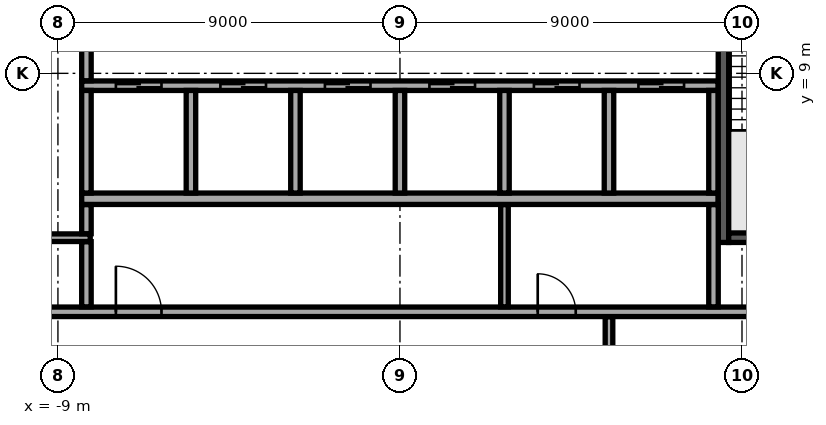
"""IFC4 building model, lengths in metres.
Left out: names, types, materials, properties, quantities, classifications, styles, units other than length and angle.
Written with IfcOpenShell. Run it as: python <this file> out.ifc"""

import sys

from ifc_helpers import new_model, si_unit, direction, frame, frame_2d, origin, place, context, subcontext, project, spatial, rectangle, extrude, element, fill, save


model = new_model("IFC4")
c1 = context("Model", 3, precision=1e-05, world=origin(), true_north=direction((0.0, 1.0)))
c2 = subcontext(c1, "Body", "Model", "MODEL_VIEW")
j1 = project(units=[si_unit("LENGTHUNIT", "METRE"), si_unit("PLANEANGLEUNIT", "RADIAN")], contexts=[c1])
p1 = place(None, origin())
s1 = spatial("IfcSite", under=j1, at=p1, CompositionType="ELEMENT")
p2 = place(p1, origin())
s2 = spatial("IfcBuilding", under=s1, at=p2, CompositionType="ELEMENT")
p3 = place(p2, frame((0.0, 0.0, 274.9)))
s3 = spatial("IfcBuildingStorey", under=s2, at=p3, CompositionType="ELEMENT", Elevation=274.9)
p4 = place(p3, frame((-8.375, 5.7, 0.0), z_axis=(0.0, 0.0, 1.0), x_axis=(1.0, 0.0, 0.0)))
e1 = element("IfcWall", 1, at=p4, inside=s3, PredefinedType="SOLIDWALL", context=c2, shape_type="SweptSolid", body=[
    extrude(rectangle(XDim=16.75, YDim=0.3, at=frame_2d((8.375, 0.0))), origin(), (0.0, 0.0, 1.0), 3.64),
])
p5 = place(p3, frame((-8.375, 8.675, 0.0), z_axis=(0.0, 0.0, 1.0), x_axis=(1.0, 0.0, 0.0)))
e2 = element("IfcWall", 2, at=p5, inside=s3, PredefinedType="SOLIDWALL", context=c2, shape_type="SweptSolid", body=[
    extrude(rectangle(XDim=16.75, YDim=0.25, at=frame_2d((8.375, 0.0))), origin(), (0.0, 0.0, 1.0), 3.64),
])
p6 = place(p5, frame((0.9, 0.0, 0.0)))
e3 = element("IfcOpeningElement", 3, at=p6, cuts=e2, PredefinedType="OPENING", context=c2, shape_type="SweptSolid", body=[
    extrude(rectangle(XDim=1.2, YDim=2.1, at=frame_2d((0.6, 1.05))), frame((0.0, 0.135, 0.0), z_axis=(0.0, -1.0, 0.0), x_axis=(1.0, 0.0, 0.0)), (0.0, 0.0, 1.0), 0.27),
])
p7 = place(p5, frame((3.65, 0.0, 0.0)))
e4 = element("IfcOpeningElement", 4, at=p7, cuts=e2, PredefinedType="OPENING", context=c2, shape_type="SweptSolid", body=[
    extrude(rectangle(XDim=1.2, YDim=2.1, at=frame_2d((0.6, 1.05))), frame((0.0, 0.135, 0.0), z_axis=(0.0, -1.0, 0.0), x_axis=(1.0, 0.0, 0.0)), (0.0, 0.0, 1.0), 0.27),
])
p8 = place(p5, frame((6.4, 0.0, 0.0)))
e5 = element("IfcOpeningElement", 5, at=p8, cuts=e2, PredefinedType="OPENING", context=c2, shape_type="SweptSolid", body=[
    extrude(rectangle(XDim=1.2, YDim=2.1, at=frame_2d((0.6, 1.05))), frame((0.0, 0.135, 0.0), z_axis=(0.0, -1.0, 0.0), x_axis=(1.0, 0.0, 0.0)), (0.0, 0.0, 1.0), 0.27),
])
p9 = place(p5, frame((9.15, 0.0, 0.0)))
e6 = element("IfcOpeningElement", 6, at=p9, cuts=e2, PredefinedType="OPENING", context=c2, shape_type="SweptSolid", body=[
    extrude(rectangle(XDim=1.2, YDim=2.1, at=frame_2d((0.6, 1.05))), frame((0.0, 0.135, 0.0), z_axis=(0.0, -1.0, 0.0), x_axis=(1.0, 0.0, 0.0)), (0.0, 0.0, 1.0), 0.27),
])
p10 = place(p5, frame((11.9, 0.0, 0.0)))
e7 = element("IfcOpeningElement", 7, at=p10, cuts=e2, PredefinedType="OPENING", context=c2, shape_type="SweptSolid", body=[
    extrude(rectangle(XDim=1.2, YDim=2.1, at=frame_2d((0.6, 1.05))), frame((0.0, 0.135, 0.0), z_axis=(0.0, -1.0, 0.0), x_axis=(1.0, 0.0, 0.0)), (0.0, 0.0, 1.0), 0.27),
])
p11 = place(p5, frame((14.65, 0.0, 0.0)))
e8 = element("IfcOpeningElement", 8, at=p11, cuts=e2, PredefinedType="OPENING", context=c2, shape_type="SweptSolid", body=[
    extrude(rectangle(XDim=1.2, YDim=2.1, at=frame_2d((0.6, 1.05))), frame((0.0, 0.135, 0.0), z_axis=(0.0, -1.0, 0.0), x_axis=(1.0, 0.0, 0.0)), (0.0, 0.0, 1.0), 0.27),
])
for number, where, z_axis, x_axis in (
    (9, (-8.25, 5.85, 0.0), (0.0, 0.0, 1.0), (0.0, 1.0, 0.0)),
    (10, (-5.5, 5.85, 0.0), (0.0, 0.0, 1.0), (0.0, 1.0, 0.0)),
    (11, (-2.75, 5.85, 0.0), (0.0, 0.0, 1.0), (0.0, 1.0, 0.0)),
    (12, (0.0, 5.85, 0.0), (0.0, 0.0, 1.0), (0.0, 1.0, 0.0)),
    (13, (2.75, 5.85, 0.0), (0.0, 0.0, 1.0), (0.0, 1.0, 0.0)),
    (14, (5.5, 5.85, 0.0), (0.0, 0.0, 1.0), (0.0, 1.0, 0.0)),
    (15, (8.25, 5.85, 0.0), (0.0, 0.0, 1.0), (0.0, 1.0, 0.0)),
):
    element("IfcWall", number, at=place(p3, frame(where, z_axis=z_axis, x_axis=x_axis)), inside=s3, PredefinedType="SOLIDWALL", context=c2, shape_type="SweptSolid", body=[
        extrude(rectangle(XDim=2.7, YDim=0.25, at=frame_2d((1.35, 0.0))), origin(), (0.0, 0.0, 1.0), 3.64),
    ])
p12 = place(p3, frame((8.512, 4.55, 0.0), z_axis=(0.0, 0.0, 1.0), x_axis=(0.0, 1.0, 0.0)))
e16 = element("IfcWall", 16, at=p12, inside=s3, PredefinedType="SOLIDWALL", context=c2, shape_type="SweptSolid", body=[
    extrude(rectangle(XDim=7.25, YDim=0.275, at=frame_2d((3.625, 0.0))), origin(), (0.0, 0.0, 1.0), 3.64),
])
p13 = place(p12, frame((6.0, 0.0, 0.0)))
e17 = element("IfcOpeningElement", 17, at=p13, cuts=e16, PredefinedType="OPENING", context=c2, shape_type="SweptSolid", body=[
    extrude(rectangle(XDim=1.0, YDim=2.1, at=frame_2d((0.5, 1.05))), frame((0.0, 0.147, 0.0), z_axis=(0.0, -1.0, 0.0), x_axis=(1.0, 0.0, 0.0)), (0.0, 0.0, 1.0), 0.295),
])
p14 = place(p3, frame((8.65, 4.675, 0.0), z_axis=(0.0, 0.0, 1.0), x_axis=(1.0, 0.0, 0.0)))
e18 = element("IfcWall", 18, at=p14, inside=s3, PredefinedType="SOLIDWALL", context=c2, shape_type="SweptSolid", body=[
    extrude(rectangle(XDim=3.15, YDim=0.25, at=frame_2d((1.575, 0.0))), origin(), (0.0, 0.0, 1.0), 3.64),
])
p15 = place(p3, frame((5.5, -2.595, 0.0), z_axis=(0.0, 0.0, 1.0), x_axis=(0.0, 1.0, 0.0)))
e19 = element("IfcWall", 19, at=p15, inside=s3, PredefinedType="PARTITIONING", context=c2, shape_type="SweptSolid", body=[
    extrude(rectangle(XDim=5.19, YDim=0.2, at=frame_2d((2.595, 0.0))), origin(), (0.0, 0.0, 1.0), 3.64),
])
p16 = place(p15, frame((1.395, 0.0, 0.0)))
e20 = element("IfcOpeningElement", 20, at=p16, cuts=e19, PredefinedType="OPENING", context=c2, shape_type="SweptSolid", body=[
    extrude(rectangle(XDim=2.4, YDim=2.4, at=frame_2d((1.2, 1.2))), frame((0.0, 0.11, 0.0), z_axis=(0.0, -1.0, 0.0), x_axis=(1.0, 0.0, 0.0)), (0.0, 0.0, 1.0), 0.22),
])
p17 = place(p3, frame((-11.795, 2.725, 0.0), z_axis=(0.0, 0.0, 1.0), x_axis=(1.0, 0.0, 0.0)))
e21 = element("IfcWall", 21, at=p17, inside=s3, PredefinedType="PARTITIONING", context=c2, shape_type="SweptSolid", body=[
    extrude(rectangle(XDim=23.59, YDim=0.25, at=frame_2d((11.795, 0.0))), origin(), (0.0, 0.0, 1.0), 3.64),
])
p18 = place(p17, frame((21.345, 0.0, 0.0)))
e22 = element("IfcOpeningElement", 22, at=p18, cuts=e21, PredefinedType="OPENING", context=c2, shape_type="SweptSolid", body=[
    extrude(rectangle(XDim=0.9, YDim=2.1, at=frame_2d((0.45, 1.05))), frame((0.0, 0.135, 0.0), z_axis=(0.0, -1.0, 0.0), x_axis=(1.0, 0.0, 0.0)), (0.0, 0.0, 1.0), 0.27),
])
p19 = place(p17, frame((1.345, 0.0, 0.0)))
e23 = element("IfcOpeningElement", 23, at=p19, cuts=e21, PredefinedType="OPENING", context=c2, shape_type="SweptSolid", body=[
    extrude(rectangle(XDim=0.9, YDim=2.1, at=frame_2d((0.45, 1.05))), frame((0.0, 0.135, 0.0), z_axis=(0.0, -1.0, 0.0), x_axis=(1.0, 0.0, 0.0)), (0.0, 0.0, 1.0), 0.27),
])
p20 = place(p17, frame((4.32, 0.0, 0.0)))
e24 = element("IfcOpeningElement", 24, at=p20, cuts=e21, PredefinedType="OPENING", context=c2, shape_type="SweptSolid", body=[
    extrude(rectangle(XDim=1.2, YDim=2.1, at=frame_2d((0.6, 1.05))), frame((0.0, 0.135, 0.0), z_axis=(0.0, -1.0, 0.0), x_axis=(1.0, 0.0, 0.0)), (0.0, 0.0, 1.0), 0.27),
])
p21 = place(p17, frame((15.42, 0.0, 0.0)))
e25 = element("IfcOpeningElement", 25, at=p21, cuts=e21, PredefinedType="OPENING", context=c2, shape_type="SweptSolid", body=[
    extrude(rectangle(XDim=1.0, YDim=2.1, at=frame_2d((0.5, 1.05))), frame((0.0, 0.135, 0.0), z_axis=(0.0, -1.0, 0.0), x_axis=(1.0, 0.0, 0.0)), (0.0, 0.0, 1.0), 0.27),
])
p22 = place(p3, frame((-8.25, 2.855, 0.0), z_axis=(0.0, 0.0, 1.0), x_axis=(0.0, 1.0, 0.0)))
e26 = element("IfcWall", 26, at=p22, inside=s3, PredefinedType="PARTITIONING", context=c2, shape_type="SweptSolid", body=[
    extrude(rectangle(XDim=1.715, YDim=0.25, at=frame_2d((0.857, 0.0))), origin(), (0.0, 0.0, 1.0), 3.64),
])
p23 = place(p3, frame((2.75, 2.855, 0.0), z_axis=(0.0, 0.0, 1.0), x_axis=(0.0, 1.0, 0.0)))
e27 = element("IfcWall", 27, at=p23, inside=s3, PredefinedType="PARTITIONING", context=c2, shape_type="SweptSolid", body=[
    extrude(rectangle(XDim=2.69, YDim=0.2, at=frame_2d((1.345, 0.0))), origin(), (0.0, 0.0, 1.0), 3.64),
])
p24 = place(p3, frame((8.25, 2.855, 0.0), z_axis=(0.0, 0.0, 1.0), x_axis=(0.0, 1.0, 0.0)))
e28 = element("IfcWall", 28, at=p24, inside=s3, PredefinedType="PARTITIONING", context=c2, shape_type="SweptSolid", body=[
    extrude(rectangle(XDim=2.69, YDim=0.25, at=frame_2d((1.345, 0.0))), origin(), (0.0, 0.0, 1.0), 3.64),
])
p25 = place(p3, frame((-11.795, 4.675, 0.0), z_axis=(0.0, 0.0, 1.0), x_axis=(1.0, 0.0, 0.0)))
e29 = element("IfcWall", 29, at=p25, inside=s3, PredefinedType="PARTITIONING", context=c2, shape_type="SweptSolid", body=[
    extrude(rectangle(XDim=3.645, YDim=0.2, at=frame_2d((1.823, 0.0))), origin(), (0.0, 0.0, 1.0), 3.64),
])
p26 = place(p3, frame((-8.25, 4.78, 0.0), z_axis=(0.0, 0.0, 1.0), x_axis=(0.0, 1.0, 0.0)))
e30 = element("IfcWall", 30, at=p26, inside=s3, PredefinedType="PARTITIONING", context=c2, shape_type="SweptSolid", body=[
    extrude(rectangle(XDim=0.765, YDim=0.25, at=frame_2d((0.382, 0.0))), origin(), (0.0, 0.0, 1.0), 3.64),
])
p27 = place(p3, frame((-8.25, 8.805, 0.0), z_axis=(0.0, 0.0, 1.0), x_axis=(0.0, 1.0, 0.0)))
e31 = element("IfcWall", 31, at=p27, inside=s3, PredefinedType="PARTITIONING", context=c2, shape_type="SweptSolid", body=[
    extrude(rectangle(XDim=2.99, YDim=0.25, at=frame_2d((1.495, 0.0))), origin(), (0.0, 0.0, 1.0), 3.64),
])
p28 = place(p27, frame((0.895, 0.0, 0.0)))
e32 = element("IfcOpeningElement", 32, at=p28, cuts=e31, PredefinedType="OPENING", context=c2, shape_type="SweptSolid", body=[
    extrude(rectangle(XDim=1.0, YDim=2.1, at=frame_2d((0.5, 1.05))), frame((0.0, 0.135, 0.0), z_axis=(0.0, -1.0, 0.0), x_axis=(1.0, 0.0, 0.0)), (0.0, 0.0, 1.0), 0.27),
])
p29 = place(p3, frame((-9.159, 32.618, 0.0), z_axis=(0.0, 0.0, 1.0), x_axis=(-0.469470468388, -0.88294817476, 0.0)))
e33 = element("IfcWall", 33, at=p29, inside=s3, PredefinedType="STANDARD", context=c2, shape_type="SweptSolid", body=[
    extrude(rectangle(XDim=48.843, YDim=0.6, at=frame_2d((24.422, 0.0))), origin(), (0.0, 0.0, 1.0), 3.64),
])
p30 = place(p29, frame((1.22, 0.0, 0.9)))
e34 = element("IfcOpeningElement", 34, at=p30, cuts=e33, PredefinedType="OPENING", context=c2, shape_type="SweptSolid", body=[
    extrude(rectangle(XDim=2.0, YDim=2.1, at=frame_2d((1.0, 1.05))), frame((0.0, 0.31, 0.0), z_axis=(0.0, -1.0, 0.0), x_axis=(1.0, 0.0, 0.0)), (0.0, 0.0, 1.0), 0.62),
])
p31 = place(p29, frame((5.66, 0.0, 0.9)))
e35 = element("IfcOpeningElement", 35, at=p31, cuts=e33, PredefinedType="OPENING", context=c2, shape_type="SweptSolid", body=[
    extrude(rectangle(XDim=2.0, YDim=2.1, at=frame_2d((1.0, 1.05))), frame((0.0, 0.31, 0.0), z_axis=(0.0, -1.0, 0.0), x_axis=(1.0, 0.0, 0.0)), (0.0, 0.0, 1.0), 0.62),
])
p32 = place(p29, frame((10.101, 0.0, 0.9)))
e36 = element("IfcOpeningElement", 36, at=p32, cuts=e33, PredefinedType="OPENING", context=c2, shape_type="SweptSolid", body=[
    extrude(rectangle(XDim=2.0, YDim=2.1, at=frame_2d((1.0, 1.05))), frame((0.0, 0.31, 0.0), z_axis=(0.0, -1.0, 0.0), x_axis=(1.0, 0.0, 0.0)), (0.0, 0.0, 1.0), 0.62),
])
p33 = place(p29, frame((14.541, 0.0, 0.9)))
e37 = element("IfcOpeningElement", 37, at=p33, cuts=e33, PredefinedType="OPENING", context=c2, shape_type="SweptSolid", body=[
    extrude(rectangle(XDim=2.0, YDim=2.1, at=frame_2d((1.0, 1.05))), frame((0.0, 0.31, 0.0), z_axis=(0.0, -1.0, 0.0), x_axis=(1.0, 0.0, 0.0)), (0.0, 0.0, 1.0), 0.62),
])
p34 = place(p29, frame((18.981, 0.0, 0.9)))
e38 = element("IfcOpeningElement", 38, at=p34, cuts=e33, PredefinedType="OPENING", context=c2, shape_type="SweptSolid", body=[
    extrude(rectangle(XDim=2.0, YDim=2.1, at=frame_2d((1.0, 1.05))), frame((0.0, 0.31, 0.0), z_axis=(0.0, -1.0, 0.0), x_axis=(1.0, 0.0, 0.0)), (0.0, 0.0, 1.0), 0.62),
])
p35 = place(p29, frame((23.422, 0.0, 0.9)))
e39 = element("IfcOpeningElement", 39, at=p35, cuts=e33, PredefinedType="OPENING", context=c2, shape_type="SweptSolid", body=[
    extrude(rectangle(XDim=2.0, YDim=2.1, at=frame_2d((1.0, 1.05))), frame((0.0, 0.31, 0.0), z_axis=(0.0, -1.0, 0.0), x_axis=(1.0, 0.0, 0.0)), (0.0, 0.0, 1.0), 0.62),
])
p36 = place(p29, frame((27.862, 0.0, 0.9)))
e40 = element("IfcOpeningElement", 40, at=p36, cuts=e33, PredefinedType="OPENING", context=c2, shape_type="SweptSolid", body=[
    extrude(rectangle(XDim=2.0, YDim=2.1, at=frame_2d((1.0, 1.05))), frame((0.0, 0.31, 0.0), z_axis=(0.0, -1.0, 0.0), x_axis=(1.0, 0.0, 0.0)), (0.0, 0.0, 1.0), 0.62),
])
p37 = place(p29, frame((32.302, 0.0, 0.9)))
e41 = element("IfcOpeningElement", 41, at=p37, cuts=e33, PredefinedType="OPENING", context=c2, shape_type="SweptSolid", body=[
    extrude(rectangle(XDim=2.0, YDim=2.1, at=frame_2d((1.0, 1.05))), frame((0.0, 0.31, 0.0), z_axis=(0.0, -1.0, 0.0), x_axis=(1.0, 0.0, 0.0)), (0.0, 0.0, 1.0), 0.62),
])
p38 = place(p29, frame((36.742, 0.0, 0.9)))
e42 = element("IfcOpeningElement", 42, at=p38, cuts=e33, PredefinedType="OPENING", context=c2, shape_type="SweptSolid", body=[
    extrude(rectangle(XDim=2.0, YDim=2.1, at=frame_2d((1.0, 1.05))), frame((0.0, 0.31, 0.0), z_axis=(0.0, -1.0, 0.0), x_axis=(1.0, 0.0, 0.0)), (0.0, 0.0, 1.0), 0.62),
])
p39 = place(p29, frame((41.183, 0.0, 0.9)))
e43 = element("IfcOpeningElement", 43, at=p39, cuts=e33, PredefinedType="OPENING", context=c2, shape_type="SweptSolid", body=[
    extrude(rectangle(XDim=2.0, YDim=2.1, at=frame_2d((1.0, 1.05))), frame((0.0, 0.31, 0.0), z_axis=(0.0, -1.0, 0.0), x_axis=(1.0, 0.0, 0.0)), (0.0, 0.0, 1.0), 0.62),
])
p40 = place(p29, frame((45.623, 0.0, 0.9)))
e44 = element("IfcOpeningElement", 44, at=p40, cuts=e33, PredefinedType="OPENING", context=c2, shape_type="SweptSolid", body=[
    extrude(rectangle(XDim=2.0, YDim=2.1, at=frame_2d((1.0, 1.05))), frame((0.0, 0.31, 0.0), z_axis=(0.0, -1.0, 0.0), x_axis=(1.0, 0.0, 0.0)), (0.0, 0.0, 1.0), 0.62),
])
p41 = place(p3, frame((9.233, -32.479, 0.0), z_axis=(0.0, 0.0, 1.0), x_axis=(0.469468429065, 0.882949259081, 0.0)))
e45 = element("IfcWall", 45, at=p41, inside=s3, PredefinedType="STANDARD", context=c2, shape_type="SweptSolid", body=[
    extrude(rectangle(XDim=48.686, YDim=0.6, at=frame_2d((24.343, 0.0))), origin(), (0.0, 0.0, 1.0), 3.64),
])
p42 = place(p41, frame((1.213, 0.0, 0.9)))
e46 = element("IfcOpeningElement", 46, at=p42, cuts=e45, PredefinedType="OPENING", context=c2, shape_type="SweptSolid", body=[
    extrude(rectangle(XDim=2.0, YDim=2.1, at=frame_2d((1.0, 1.05))), frame((0.0, 0.31, 0.0), z_axis=(0.0, -1.0, 0.0), x_axis=(1.0, 0.0, 0.0)), (0.0, 0.0, 1.0), 0.62),
])
p43 = place(p41, frame((5.639, 0.0, 0.9)))
e47 = element("IfcOpeningElement", 47, at=p43, cuts=e45, PredefinedType="OPENING", context=c2, shape_type="SweptSolid", body=[
    extrude(rectangle(XDim=2.0, YDim=2.1, at=frame_2d((1.0, 1.05))), frame((0.0, 0.31, 0.0), z_axis=(0.0, -1.0, 0.0), x_axis=(1.0, 0.0, 0.0)), (0.0, 0.0, 1.0), 0.62),
])
p44 = place(p41, frame((10.065, 0.0, 0.9)))
e48 = element("IfcOpeningElement", 48, at=p44, cuts=e45, PredefinedType="OPENING", context=c2, shape_type="SweptSolid", body=[
    extrude(rectangle(XDim=2.0, YDim=2.1, at=frame_2d((1.0, 1.05))), frame((0.0, 0.31, 0.0), z_axis=(0.0, -1.0, 0.0), x_axis=(1.0, 0.0, 0.0)), (0.0, 0.0, 1.0), 0.62),
])
p45 = place(p41, frame((14.491, 0.0, 0.9)))
e49 = element("IfcOpeningElement", 49, at=p45, cuts=e45, PredefinedType="OPENING", context=c2, shape_type="SweptSolid", body=[
    extrude(rectangle(XDim=2.0, YDim=2.1, at=frame_2d((1.0, 1.05))), frame((0.0, 0.31, 0.0), z_axis=(0.0, -1.0, 0.0), x_axis=(1.0, 0.0, 0.0)), (0.0, 0.0, 1.0), 0.62),
])
p46 = place(p41, frame((18.917, 0.0, 0.9)))
e50 = element("IfcOpeningElement", 50, at=p46, cuts=e45, PredefinedType="OPENING", context=c2, shape_type="SweptSolid", body=[
    extrude(rectangle(XDim=2.0, YDim=2.1, at=frame_2d((1.0, 1.05))), frame((0.0, 0.31, 0.0), z_axis=(0.0, -1.0, 0.0), x_axis=(1.0, 0.0, 0.0)), (0.0, 0.0, 1.0), 0.62),
])
p47 = place(p41, frame((23.343, 0.0, 0.9)))
e51 = element("IfcOpeningElement", 51, at=p47, cuts=e45, PredefinedType="OPENING", context=c2, shape_type="SweptSolid", body=[
    extrude(rectangle(XDim=2.0, YDim=2.1, at=frame_2d((1.0, 1.05))), frame((0.0, 0.31, 0.0), z_axis=(0.0, -1.0, 0.0), x_axis=(1.0, 0.0, 0.0)), (0.0, 0.0, 1.0), 0.62),
])
p48 = place(p41, frame((27.769, 0.0, 0.9)))
e52 = element("IfcOpeningElement", 52, at=p48, cuts=e45, PredefinedType="OPENING", context=c2, shape_type="SweptSolid", body=[
    extrude(rectangle(XDim=2.0, YDim=2.1, at=frame_2d((1.0, 1.05))), frame((0.0, 0.31, 0.0), z_axis=(0.0, -1.0, 0.0), x_axis=(1.0, 0.0, 0.0)), (0.0, 0.0, 1.0), 0.62),
])
p49 = place(p41, frame((32.195, 0.0, 0.9)))
e53 = element("IfcOpeningElement", 53, at=p49, cuts=e45, PredefinedType="OPENING", context=c2, shape_type="SweptSolid", body=[
    extrude(rectangle(XDim=2.0, YDim=2.1, at=frame_2d((1.0, 1.05))), frame((0.0, 0.31, 0.0), z_axis=(0.0, -1.0, 0.0), x_axis=(1.0, 0.0, 0.0)), (0.0, 0.0, 1.0), 0.62),
])
p50 = place(p41, frame((36.621, 0.0, 0.9)))
e54 = element("IfcOpeningElement", 54, at=p50, cuts=e45, PredefinedType="OPENING", context=c2, shape_type="SweptSolid", body=[
    extrude(rectangle(XDim=2.0, YDim=2.1, at=frame_2d((1.0, 1.05))), frame((0.0, 0.31, 0.0), z_axis=(0.0, -1.0, 0.0), x_axis=(1.0, 0.0, 0.0)), (0.0, 0.0, 1.0), 0.62),
])
p51 = place(p41, frame((41.047, 0.0, 0.9)))
e55 = element("IfcOpeningElement", 55, at=p51, cuts=e45, PredefinedType="OPENING", context=c2, shape_type="SweptSolid", body=[
    extrude(rectangle(XDim=2.0, YDim=2.1, at=frame_2d((1.0, 1.05))), frame((0.0, 0.31, 0.0), z_axis=(0.0, -1.0, 0.0), x_axis=(1.0, 0.0, 0.0)), (0.0, 0.0, 1.0), 0.62),
])
p52 = place(p41, frame((45.473, 0.0, 0.9)))
e56 = element("IfcOpeningElement", 56, at=p52, cuts=e45, PredefinedType="OPENING", context=c2, shape_type="SweptSolid", body=[
    extrude(rectangle(XDim=2.0, YDim=2.1, at=frame_2d((1.0, 1.05))), frame((0.0, 0.31, 0.0), z_axis=(0.0, -1.0, 0.0), x_axis=(1.0, 0.0, 0.0)), (0.0, 0.0, 1.0), 0.62),
])
p53 = place(p3, frame((-8.385, 26.033, 0.0), z_axis=(0.0, 0.0, 1.0), x_axis=(0.882949433839, -0.46946810039, 0.0)))
e57 = element("IfcWall", 57, at=p53, inside=s3, PredefinedType="PARTITIONING", context=c2, shape_type="SweptSolid", body=[
    extrude(rectangle(XDim=39.325, YDim=0.15, at=frame_2d((19.662, 0.0))), origin(), (0.0, 0.0, 1.0), 3.04),
])
p54 = place(p53, frame((10.622, 0.0, 0.0)))
e58 = element("IfcOpeningElement", 58, at=p54, cuts=e57, PredefinedType="OPENING", context=c2, shape_type="SweptSolid", body=[
    extrude(rectangle(XDim=1.0, YDim=2.1, at=frame_2d((0.5, 1.05))), frame((0.0, 0.085, 0.0), z_axis=(0.0, -1.0, 0.0), x_axis=(1.0, 0.0, 0.0)), (0.0, 0.0, 1.0), 0.17),
])
p55 = place(p53, frame((16.615, 0.0, 0.0)))
e59 = element("IfcOpeningElement", 59, at=p55, cuts=e57, PredefinedType="OPENING", context=c2, shape_type="SweptSolid", body=[
    extrude(rectangle(XDim=1.0, YDim=2.1, at=frame_2d((0.5, 1.05))), frame((0.0, 0.085, 0.0), z_axis=(0.0, -1.0, 0.0), x_axis=(1.0, 0.0, 0.0)), (0.0, 0.0, 1.0), 0.17),
])
p56 = place(p53, frame((28.254, 0.0, 0.0)))
e60 = element("IfcOpeningElement", 60, at=p56, cuts=e57, PredefinedType="OPENING", context=c2, shape_type="SweptSolid", body=[
    extrude(rectangle(XDim=1.0, YDim=2.1, at=frame_2d((0.5, 1.05))), frame((0.0, 0.085, 0.0), z_axis=(0.0, -1.0, 0.0), x_axis=(1.0, 0.0, 0.0)), (0.0, 0.0, 1.0), 0.17),
])
p57 = place(p6, origin())
e61 = element("IfcDoor", 61, at=p57, inside=s3, OperationType="DOUBLE_DOOR_SLIDING", PredefinedType="DOOR", context=c2, shape_type="SweptSolid", body=[
    extrude(rectangle(XDim=1.2, YDim=2.1, at=frame_2d((0.6, 1.05))), frame((0.0, 0.025, 0.0), z_axis=(0.0, -1.0, 0.0), x_axis=(1.0, 0.0, 0.0)), (0.0, 0.0, 1.0), 0.05),
])
fill(e3, e61)
p58 = place(p7, origin())
e62 = element("IfcDoor", 62, at=p58, inside=s3, OperationType="DOUBLE_DOOR_SLIDING", PredefinedType="DOOR", context=c2, shape_type="SweptSolid", body=[
    extrude(rectangle(XDim=1.2, YDim=2.1, at=frame_2d((0.6, 1.05))), frame((0.0, 0.025, 0.0), z_axis=(0.0, -1.0, 0.0), x_axis=(1.0, 0.0, 0.0)), (0.0, 0.0, 1.0), 0.05),
])
fill(e4, e62)
p59 = place(p8, origin())
e63 = element("IfcDoor", 63, at=p59, inside=s3, OperationType="DOUBLE_DOOR_SLIDING", PredefinedType="DOOR", context=c2, shape_type="SweptSolid", body=[
    extrude(rectangle(XDim=1.2, YDim=2.1, at=frame_2d((0.6, 1.05))), frame((0.0, 0.025, 0.0), z_axis=(0.0, -1.0, 0.0), x_axis=(1.0, 0.0, 0.0)), (0.0, 0.0, 1.0), 0.05),
])
fill(e5, e63)
p60 = place(p9, origin())
e64 = element("IfcDoor", 64, at=p60, inside=s3, OperationType="DOUBLE_DOOR_SLIDING", PredefinedType="DOOR", context=c2, shape_type="SweptSolid", body=[
    extrude(rectangle(XDim=1.2, YDim=2.1, at=frame_2d((0.6, 1.05))), frame((0.0, 0.025, 0.0), z_axis=(0.0, -1.0, 0.0), x_axis=(1.0, 0.0, 0.0)), (0.0, 0.0, 1.0), 0.05),
])
fill(e6, e64)
p61 = place(p10, origin())
e65 = element("IfcDoor", 65, at=p61, inside=s3, OperationType="DOUBLE_DOOR_SLIDING", PredefinedType="DOOR", context=c2, shape_type="SweptSolid", body=[
    extrude(rectangle(XDim=1.2, YDim=2.1, at=frame_2d((0.6, 1.05))), frame((0.0, 0.025, 0.0), z_axis=(0.0, -1.0, 0.0), x_axis=(1.0, 0.0, 0.0)), (0.0, 0.0, 1.0), 0.05),
])
fill(e7, e65)
p62 = place(p11, origin())
e66 = element("IfcDoor", 66, at=p62, inside=s3, OperationType="DOUBLE_DOOR_SLIDING", PredefinedType="DOOR", context=c2, shape_type="SweptSolid", body=[
    extrude(rectangle(XDim=1.2, YDim=2.1, at=frame_2d((0.6, 1.05))), frame((0.0, 0.025, 0.0), z_axis=(0.0, -1.0, 0.0), x_axis=(1.0, 0.0, 0.0)), (0.0, 0.0, 1.0), 0.05),
])
fill(e8, e66)
p63 = place(p20, origin())
e67 = element("IfcDoor", 67, at=p63, inside=s3, OperationType="SINGLE_SWING_LEFT", PredefinedType="DOOR", context=c2, shape_type="SweptSolid", body=[
    extrude(rectangle(XDim=1.2, YDim=2.1, at=frame_2d((0.6, 1.05))), frame((0.0, 0.025, 0.0), z_axis=(0.0, -1.0, 0.0), x_axis=(1.0, 0.0, 0.0)), (0.0, 0.0, 1.0), 0.05),
])
fill(e24, e67)
p64 = place(p21, origin())
e68 = element("IfcDoor", 68, at=p64, inside=s3, OperationType="SINGLE_SWING_RIGHT", PredefinedType="DOOR", context=c2, shape_type="SweptSolid", body=[
    extrude(rectangle(XDim=1.0, YDim=2.1, at=frame_2d((0.5, 1.05))), frame((0.0, 0.025, 0.0), z_axis=(0.0, -1.0, 0.0), x_axis=(1.0, 0.0, 0.0)), (0.0, 0.0, 1.0), 0.05),
])
fill(e25, e68)
save(model, sys.argv[1])
